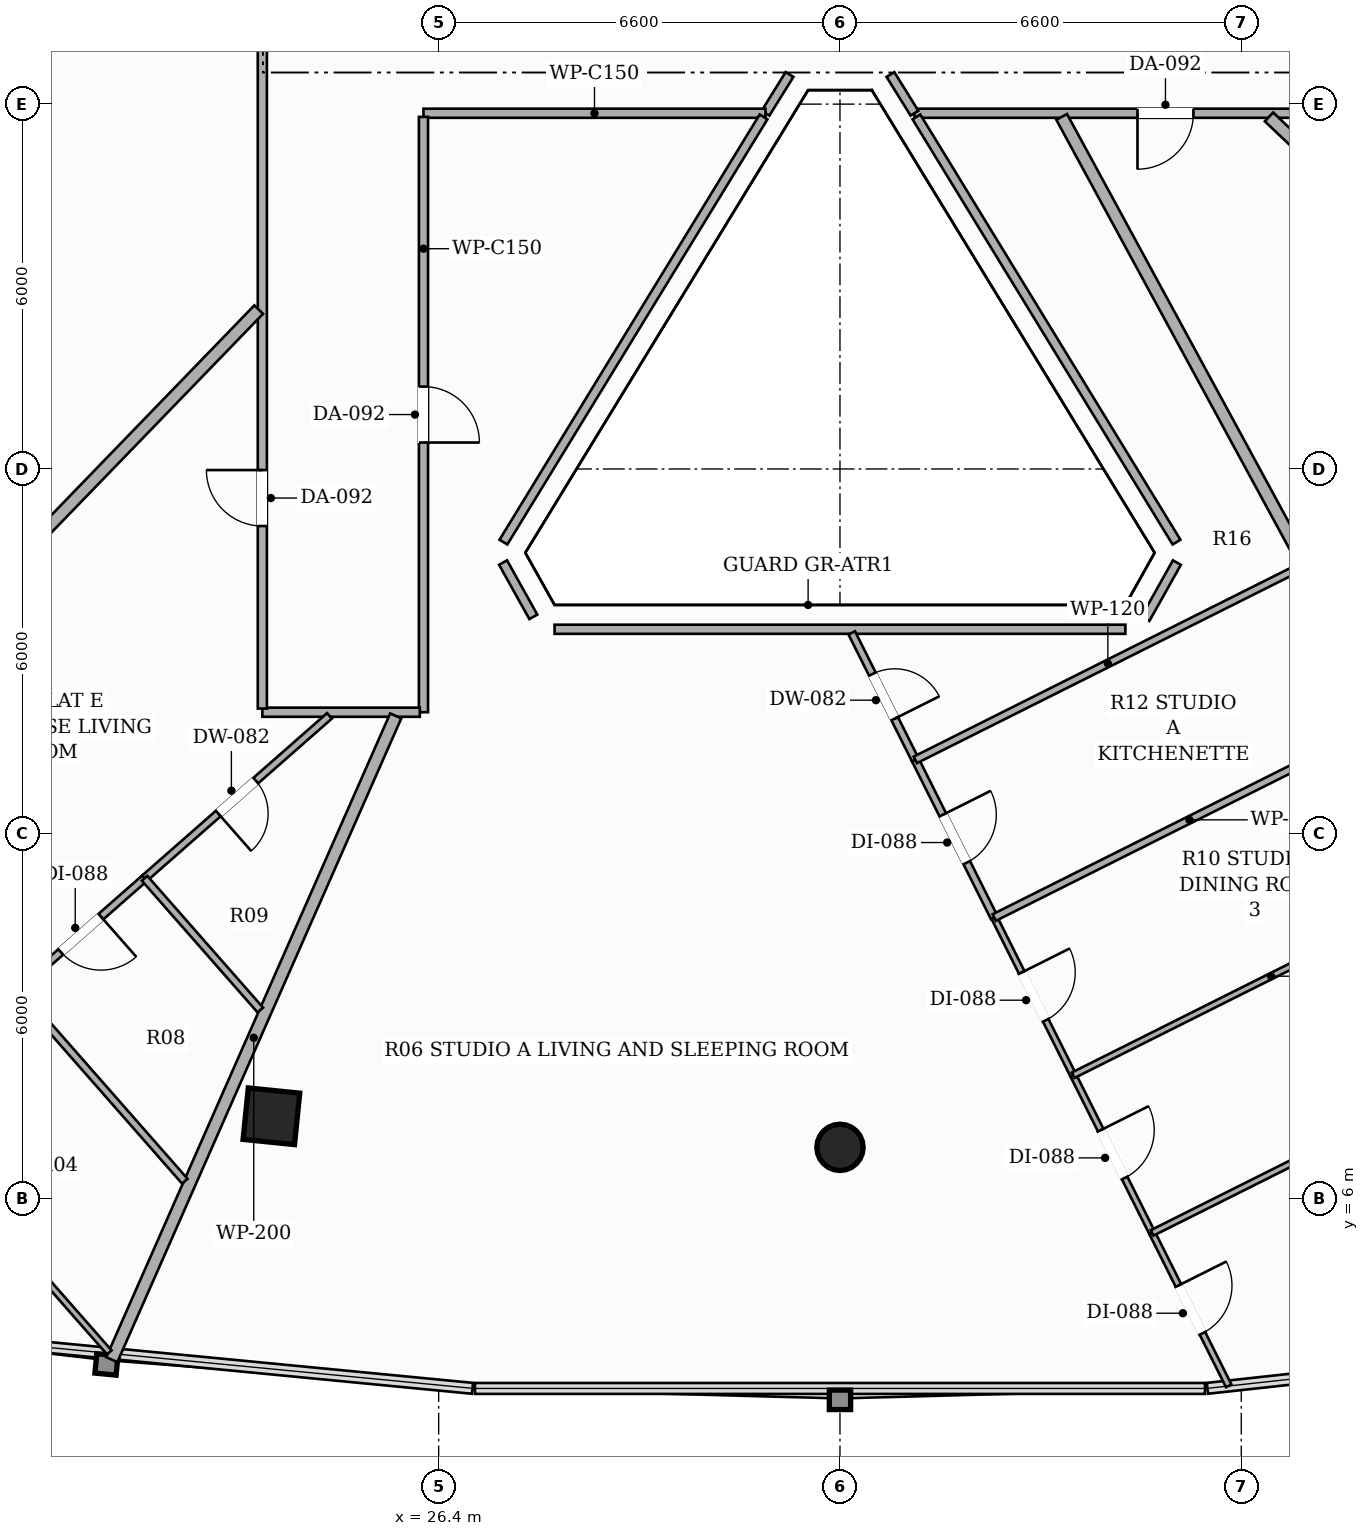
"""IFC4 building model, lengths in metres.
Left out: names, types, materials, properties, quantities, classifications, styles, units other than length and angle.
Written with IfcOpenShell. Run it as: python <this file> out.ifc"""

import sys

from ifc_helpers import new_model, si_unit, direction, frame, frame_2d, origin, origin_2d, place, context, subcontext, project, spatial, rectangle, hollow_rectangle, hollow_circle, extrude, element, fill, save


model = new_model("IFC4")
c1 = context("Model", 3, precision=1e-05, world=origin(), true_north=direction((0.0, 1.0)))
c2 = subcontext(c1, "Body", "Model", "MODEL_VIEW")
j1 = project(units=[si_unit("LENGTHUNIT", "METRE"), si_unit("PLANEANGLEUNIT", "RADIAN")], contexts=[c1])
p1 = place(None, origin())
s1 = spatial("IfcSite", under=j1, at=p1, CompositionType="ELEMENT")
p2 = place(p1, origin())
s2 = spatial("IfcBuilding", under=s1, at=p2, CompositionType="ELEMENT")
p3 = place(p2, frame((0.0, 0.0, 113.3)))
s3 = spatial("IfcBuildingStorey", under=s2, at=p3, CompositionType="ELEMENT", Elevation=113.3)
p4 = place(p3, frame((23.649, 7.355, 0.0), z_axis=(0.0, 0.0, 1.0), x_axis=(-0.994880708829, 0.101056297183, 0.0)))
e1 = element("IfcColumn", 1, at=p4, inside=s3, PredefinedType="COLUMN", context=c2, shape_type="SweptSolid", body=[
    extrude(hollow_rectangle(XDim=0.85, YDim=0.85, WallThickness=0.028, at=origin_2d()), origin(), (0.0, 0.0, 1.0), 3.3),
])
p5 = place(p3, frame((33.0, 6.844, 0.0), z_axis=(0.0, 0.0, 1.0), x_axis=(1.0, 0.0, 0.0)))
e2 = element("IfcColumn", 2, at=p5, inside=s3, PredefinedType="COLUMN", context=c2, shape_type="SweptSolid", body=[
    extrude(hollow_circle(Radius=0.381, WallThickness=0.022, at=origin_2d()), origin(), (0.0, 0.0, 1.0), 3.3),
])
p6 = place(p3, frame((20.095, 34.718, 0.0), z_axis=(0.0, 0.0, 1.0), x_axis=(-0.514362369366, -0.857572943242, 0.0)))
e3 = element("IfcWall", 3, at=p6, inside=s3, PredefinedType="SOLIDWALL", context=c2, shape_type="SweptSolid", body=[
    extrude(rectangle(XDim=11.844, YDim=0.24, at=frame_2d((5.922, 0.0))), origin(), (0.0, 0.0, 1.0), 2.624),
])
p7 = place(p6, frame((9.346, 0.0, 0.0)))
e4 = element("IfcOpeningElement", 4, at=p7, cuts=e3, PredefinedType="OPENING", context=c2, shape_type="SweptSolid", body=[
    extrude(rectangle(XDim=1.8, YDim=2.2, at=frame_2d((0.9, 1.1))), frame((0.0, 0.13, 0.0), z_axis=(0.0, -1.0, 0.0), x_axis=(1.0, 0.0, 0.0)), (0.0, 0.0, 1.0), 0.26),
])
p8 = place(p3, frame((32.17, 24.487, 0.0), z_axis=(0.0, 0.0, 1.0), x_axis=(-0.527038486816, -0.849841416627, 0.0)))
e5 = element("IfcWall", 5, at=p8, inside=s3, PredefinedType="PARTITIONING", context=c2, shape_type="SweptSolid", body=[
    extrude(rectangle(XDim=0.75, YDim=0.15, at=frame_2d((0.375, 0.0))), origin(), (0.0, 0.0, 1.0), 3.06),
])
p9 = place(p3, frame((31.775, 23.85, 0.0), z_axis=(0.0, 0.0, 1.0), x_axis=(-1.0, 0.0, 0.0)))
e6 = element("IfcWall", 6, at=p9, inside=s3, PredefinedType="PARTITIONING", context=c2, shape_type="SweptSolid", body=[
    extrude(rectangle(XDim=5.625, YDim=0.15, at=frame_2d((2.812, 0.0))), origin(), (0.0, 0.0, 1.0), 2.721),
])
p10 = place(p3, frame((26.15, 23.79, 0.0), z_axis=(0.0, 0.0, 1.0), x_axis=(0.0, -1.0, 0.0)))
e7 = element("IfcWall", 7, at=p10, inside=s3, PredefinedType="PARTITIONING", context=c2, shape_type="SweptSolid", body=[
    extrude(rectangle(XDim=9.79, YDim=0.15, at=frame_2d((4.895, 0.0))), origin(), (0.0, 0.0, 1.0), 2.721),
])
p11 = place(p10, frame((4.435, 0.0, 0.0)))
e8 = element("IfcOpeningElement", 8, at=p11, cuts=e7, PredefinedType="OPENING", context=c2, shape_type="SweptSolid", body=[
    extrude(rectangle(XDim=0.92, YDim=2.15, at=frame_2d((0.46, 1.075))), frame((0.0, 0.085, 0.0), z_axis=(0.0, -1.0, 0.0), x_axis=(1.0, 0.0, 0.0)), (0.0, 0.0, 1.0), 0.17),
])
p12 = place(p3, frame((26.09, 14.0, 0.0), z_axis=(0.0, 0.0, 1.0), x_axis=(-1.0, 0.0, 0.0)))
e9 = element("IfcWall", 9, at=p12, inside=s3, PredefinedType="PARTITIONING", context=c2, shape_type="SweptSolid", body=[
    extrude(rectangle(XDim=2.59, YDim=0.15, at=frame_2d((1.295, 0.0))), origin(), (0.0, 0.0, 1.0), 2.721),
])
p13 = place(p3, frame((23.5, 14.06, 0.0), z_axis=(0.0, 0.0, 1.0), x_axis=(0.0, 1.0, 0.0)))
e10 = element("IfcWall", 10, at=p13, inside=s3, PredefinedType="PARTITIONING", context=c2, shape_type="SweptSolid", body=[
    extrude(rectangle(XDim=22.84, YDim=0.15, at=frame_2d((11.42, 0.0))), origin(), (0.0, 0.0, 1.0), 2.413),
])
p14 = place(p13, frame((13.373, 0.0, 0.0)))
e11 = element("IfcOpeningElement", 11, at=p14, cuts=e10, PredefinedType="OPENING", context=c2, shape_type="SweptSolid", body=[
    extrude(rectangle(XDim=0.88, YDim=2.1, at=frame_2d((0.44, 1.05))), frame((0.0, 0.085, 0.0), z_axis=(0.0, -1.0, 0.0), x_axis=(1.0, 0.0, 0.0)), (0.0, 0.0, 1.0), 0.17),
])
p15 = place(p13, frame((3.002, 0.0, 0.0)))
e12 = element("IfcOpeningElement", 12, at=p15, cuts=e10, PredefinedType="OPENING", context=c2, shape_type="SweptSolid", body=[
    extrude(rectangle(XDim=0.92, YDim=2.15, at=frame_2d((0.46, 1.075))), frame((0.0, 0.085, 0.0), z_axis=(0.0, -1.0, 0.0), x_axis=(1.0, 0.0, 0.0)), (0.0, 0.0, 1.0), 0.17),
])
p16 = place(p3, frame((42.29, 23.85, 0.0), z_axis=(0.0, 0.0, 1.0), x_axis=(-1.0, 0.0, 0.0)))
e13 = element("IfcWall", 13, at=p16, inside=s3, PredefinedType="PARTITIONING", context=c2, shape_type="SweptSolid", body=[
    extrude(rectangle(XDim=8.065, YDim=0.15, at=frame_2d((4.032, 0.0))), origin(), (0.0, 0.0, 1.0), 2.492),
])
p17 = place(p16, frame((3.477, 0.0, 0.0)))
e14 = element("IfcOpeningElement", 14, at=p17, cuts=e13, PredefinedType="OPENING", context=c2, shape_type="SweptSolid", body=[
    extrude(rectangle(XDim=0.92, YDim=2.15, at=frame_2d((0.46, 1.075))), frame((0.0, 0.085, 0.0), z_axis=(0.0, -1.0, 0.0), x_axis=(1.0, 0.0, 0.0)), (0.0, 0.0, 1.0), 0.17),
])
p18 = place(p16, frame((0.14, 0.0, 0.0)))
e15 = element("IfcOpeningElement", 15, at=p18, cuts=e13, PredefinedType="OPENING", context=c2, shape_type="SweptSolid", body=[
    extrude(rectangle(XDim=0.88, YDim=2.1, at=frame_2d((0.44, 1.05))), frame((0.0, 0.085, 0.0), z_axis=(0.0, -1.0, 0.0), x_axis=(1.0, 0.0, 0.0)), (0.0, 0.0, 1.0), 0.17),
])
p19 = place(p3, frame((34.225, 23.851, 0.0), z_axis=(0.0, 0.0, 1.0), x_axis=(-0.527622593928, 0.849478898135, 0.0)))
e16 = element("IfcWall", 16, at=p19, inside=s3, PredefinedType="PARTITIONING", context=c2, shape_type="SweptSolid", body=[
    extrude(rectangle(XDim=0.749, YDim=0.15, at=frame_2d((0.375, 0.0))), origin(), (0.0, 0.0, 1.0), 3.06),
])
p20 = place(p3, frame((34.257, 23.79, 0.0), z_axis=(0.0, 0.0, 1.0), x_axis=(0.521839061235, -0.853043957935, 0.0)))
e17 = element("IfcWall", 17, at=p20, inside=s3, PredefinedType="PARTITIONING", context=c2, shape_type="SweptSolid", body=[
    extrude(rectangle(XDim=8.198, YDim=0.15, at=frame_2d((4.099, 0.0))), origin(), (0.0, 0.0, 1.0), 2.721),
])
p21 = place(p3, frame((38.541, 16.461, 0.0), z_axis=(0.0, 0.0, 1.0), x_axis=(-0.488631416095, -0.872490308946, 0.0)))
e18 = element("IfcWall", 18, at=p21, inside=s3, PredefinedType="PARTITIONING", context=c2, shape_type="SweptSolid", body=[
    extrude(rectangle(XDim=1.06, YDim=0.15, at=frame_2d((0.53, 0.0))), origin(), (0.0, 0.0, 1.0), 3.06),
])
p22 = place(p3, frame((37.694, 15.364, 0.0), z_axis=(0.0, 0.0, 1.0), x_axis=(-1.0, 0.0, 0.0)))
e19 = element("IfcWall", 19, at=p22, inside=s3, PredefinedType="PARTITIONING", context=c2, shape_type="SweptSolid", body=[
    extrude(rectangle(XDim=9.388, YDim=0.15, at=frame_2d((4.694, 0.0))), origin(), (0.0, 0.0, 1.0), 2.721),
])
p23 = place(p3, frame((27.957, 15.568, 0.0), z_axis=(0.0, 0.0, 1.0), x_axis=(-0.487162890713, 0.873311123204, 0.0)))
e20 = element("IfcWall", 20, at=p23, inside=s3, PredefinedType="PARTITIONING", context=c2, shape_type="SweptSolid", body=[
    extrude(rectangle(XDim=1.022, YDim=0.15, at=frame_2d((0.511, 0.0))), origin(), (0.0, 0.0, 1.0), 3.06),
])
p24 = place(p3, frame((27.465, 16.797, 0.0), z_axis=(0.0, 0.0, 1.0), x_axis=(0.521839061235, 0.853043957935, 0.0)))
e21 = element("IfcWall", 21, at=p24, inside=s3, PredefinedType="PARTITIONING", context=c2, shape_type="SweptSolid", body=[
    extrude(rectangle(XDim=8.198, YDim=0.15, at=frame_2d((4.099, 0.0))), origin(), (0.0, 0.0, 1.0), 2.721),
])
p25 = place(p3, frame((36.646, 23.79, 0.0), z_axis=(0.0, 0.0, 1.0), x_axis=(0.477391569207, -0.878690667784, 0.0)))
e22 = element("IfcWall", 22, at=p25, inside=s3, PredefinedType="PARTITIONING", context=c2, shape_type="SweptSolid", body=[
    extrude(rectangle(XDim=22.918, YDim=0.2, at=frame_2d((11.459, 0.0))), origin(), (0.0, 0.0, 1.0), 2.413),
])
p26 = place(p3, frame((21.024, 3.353, 0.0), z_axis=(0.0, 0.0, 1.0), x_axis=(0.403601766718, 0.914934759369, 0.0)))
e23 = element("IfcWall", 23, at=p26, inside=s3, PredefinedType="PARTITIONING", context=c2, shape_type="SweptSolid", body=[
    extrude(rectangle(XDim=11.571, YDim=0.2, at=frame_2d((5.786, 0.0))), origin(), (0.0, 0.0, 1.0), 2.413),
])
p27 = place(p3, frame((23.44, 20.621, 0.0), z_axis=(0.0, 0.0, 1.0), x_axis=(-0.695405261367, -0.718617786075, 0.0)))
e24 = element("IfcWall", 24, at=p27, inside=s3, PredefinedType="PARTITIONING", context=c2, shape_type="SweptSolid", body=[
    extrude(rectangle(XDim=21.635, YDim=0.2, at=frame_2d((10.817, 0.0))), origin(), (0.0, 0.0, 1.0), 2.413),
])
p28 = place(p3, frame((40.056, 23.79, 0.0), z_axis=(0.0, 0.0, 1.0), x_axis=(0.724633427165, -0.68913452695, 0.0)))
e25 = element("IfcWall", 25, at=p28, inside=s3, PredefinedType="PARTITIONING", context=c2, shape_type="SweptSolid", body=[
    extrude(rectangle(XDim=25.921, YDim=0.2, at=frame_2d((12.96, 0.0))), origin(), (0.0, 0.0, 1.0), 2.413),
])
p29 = place(p3, frame((33.194, 15.304, 0.0), z_axis=(0.0, 0.0, 1.0), x_axis=(0.447548179666, -0.894259820677, 0.0)))
e26 = element("IfcWall", 26, at=p29, inside=s3, PredefinedType="PARTITIONING", context=c2, shape_type="SweptSolid", body=[
    extrude(rectangle(XDim=2.335, YDim=0.12, at=frame_2d((1.167, 0.0))), origin(), (0.0, 0.0, 1.0), 2.721),
])
p30 = place(p29, frame((0.757, 0.0, 0.0)))
e27 = element("IfcOpeningElement", 27, at=p30, cuts=e26, PredefinedType="OPENING", context=c2, shape_type="SweptSolid", body=[
    extrude(rectangle(XDim=0.82, YDim=2.1, at=frame_2d((0.41, 1.05))), frame((0.0, 0.07, 0.0), z_axis=(0.0, -1.0, 0.0), x_axis=(1.0, 0.0, 0.0)), (0.0, 0.0, 1.0), 0.14),
])
p31 = place(p3, frame((34.239, 13.216, 0.0), z_axis=(0.0, 0.0, 1.0), x_axis=(0.447651342751, -0.894208183441, 0.0)))
e28 = element("IfcWall", 28, at=p31, inside=s3, PredefinedType="PARTITIONING", context=c2, shape_type="SweptSolid", body=[
    extrude(rectangle(XDim=2.9, YDim=0.12, at=frame_2d((1.45, 0.0))), origin(), (0.0, 0.0, 1.0), 3.06),
])
p32 = place(p31, frame((1.01, 0.0, 0.0)))
e29 = element("IfcOpeningElement", 29, at=p32, cuts=e28, PredefinedType="OPENING", context=c2, shape_type="SweptSolid", body=[
    extrude(rectangle(XDim=0.88, YDim=2.1, at=frame_2d((0.44, 1.05))), frame((0.0, 0.07, 0.0), z_axis=(0.0, -1.0, 0.0), x_axis=(1.0, 0.0, 0.0)), (0.0, 0.0, 1.0), 0.14),
])
p33 = place(p3, frame((38.134, 5.437, 0.0), z_axis=(0.0, 0.0, 1.0), x_axis=(0.447768773835, -0.894149386388, 0.0)))
e30 = element("IfcWall", 30, at=p33, inside=s3, PredefinedType="PARTITIONING", context=c2, shape_type="SweptSolid", body=[
    extrude(rectangle(XDim=2.814, YDim=0.1, at=frame_2d((1.407, 0.0))), origin(), (0.0, 0.0, 1.0), 3.06),
])
p34 = place(p33, frame((0.967, 0.0, 0.0)))
e31 = element("IfcOpeningElement", 31, at=p34, cuts=e30, PredefinedType="OPENING", context=c2, shape_type="SweptSolid", body=[
    extrude(rectangle(XDim=0.88, YDim=2.1, at=frame_2d((0.44, 1.05))), frame((0.0, 0.06, 0.0), z_axis=(0.0, -1.0, 0.0), x_axis=(1.0, 0.0, 0.0)), (0.0, 0.0, 1.0), 0.12),
])
p35 = place(p3, frame((36.836, 8.03, 0.0), z_axis=(0.0, 0.0, 1.0), x_axis=(0.447651342751, -0.894208183441, 0.0)))
e32 = element("IfcWall", 32, at=p35, inside=s3, PredefinedType="PARTITIONING", context=c2, shape_type="SweptSolid", body=[
    extrude(rectangle(XDim=2.9, YDim=0.1, at=frame_2d((1.45, 0.0))), origin(), (0.0, 0.0, 1.0), 2.413),
])
p36 = place(p35, frame((1.01, 0.0, 0.0)))
e33 = element("IfcOpeningElement", 33, at=p36, cuts=e32, PredefinedType="OPENING", context=c2, shape_type="SweptSolid", body=[
    extrude(rectangle(XDim=0.88, YDim=2.1, at=frame_2d((0.44, 1.05))), frame((0.0, 0.06, 0.0), z_axis=(0.0, -1.0, 0.0), x_axis=(1.0, 0.0, 0.0)), (0.0, 0.0, 1.0), 0.12),
])
p37 = place(p3, frame((35.537, 10.623, 0.0), z_axis=(0.0, 0.0, 1.0), x_axis=(0.447853271476, -0.894107066983, 0.0)))
e34 = element("IfcWall", 34, at=p37, inside=s3, PredefinedType="PARTITIONING", context=c2, shape_type="SweptSolid", body=[
    extrude(rectangle(XDim=2.9, YDim=0.1, at=frame_2d((1.45, 0.0))), origin(), (0.0, 0.0, 1.0), 3.06),
])
p38 = place(p37, frame((1.01, 0.0, 0.0)))
e35 = element("IfcOpeningElement", 35, at=p38, cuts=e34, PredefinedType="OPENING", context=c2, shape_type="SweptSolid", body=[
    extrude(rectangle(XDim=0.88, YDim=2.1, at=frame_2d((0.44, 1.05))), frame((0.0, 0.06, 0.0), z_axis=(0.0, -1.0, 0.0), x_axis=(1.0, 0.0, 0.0)), (0.0, 0.0, 1.0), 0.12),
])
p39 = place(p3, frame((40.572, 16.387, 0.0), z_axis=(0.0, 0.0, 1.0), x_axis=(-0.894178861749, -0.447709909653, 0.0)))
e36 = element("IfcWall", 36, at=p39, inside=s3, PredefinedType="PARTITIONING", context=c2, shape_type="SweptSolid", body=[
    extrude(rectangle(XDim=7.083, YDim=0.12, at=frame_2d((3.541, 0.0))), origin(), (0.0, 0.0, 1.0), 2.721),
])
p40 = place(p3, frame((41.957, 13.837, 0.0), z_axis=(0.0, 0.0, 1.0), x_axis=(-0.894209449688, -0.447648813344, 0.0)))
e37 = element("IfcWall", 37, at=p40, inside=s3, PredefinedType="PARTITIONING", context=c2, shape_type="SweptSolid", body=[
    extrude(rectangle(XDim=7.179, YDim=0.12, at=frame_2d((3.59, 0.0))), origin(), (0.0, 0.0, 1.0), 2.721),
])
p41 = place(p3, frame((38.134, 5.437, 0.0), z_axis=(0.0, 0.0, 1.0), x_axis=(0.894182030014, 0.447703581849, 0.0)))
e38 = element("IfcWall", 38, at=p41, inside=s3, PredefinedType="PARTITIONING", context=c2, shape_type="SweptSolid", body=[
    extrude(rectangle(XDim=7.373, YDim=0.1, at=frame_2d((3.687, 0.0))), origin(), (0.0, 0.0, 1.0), 2.413),
])
p42 = place(p3, frame((36.836, 8.03, 0.0), z_axis=(0.0, 0.0, 1.0), x_axis=(0.894205618721, 0.447656465884, 0.0)))
e39 = element("IfcWall", 39, at=p42, inside=s3, PredefinedType="PARTITIONING", context=c2, shape_type="SweptSolid", body=[
    extrude(rectangle(XDim=7.276, YDim=0.1, at=frame_2d((3.638, 0.0))), origin(), (0.0, 0.0, 1.0), 2.721),
])
p43 = place(p3, frame((24.604, 13.94, 0.0), z_axis=(0.0, 0.0, 1.0), x_axis=(-0.751349767919, -0.659904179595, 0.0)))
e40 = element("IfcWall", 40, at=p43, inside=s3, PredefinedType="PARTITIONING", context=c2, shape_type="SweptSolid", body=[
    extrude(rectangle(XDim=4.047, YDim=0.12, at=frame_2d((2.024, 0.0))), origin(), (0.0, 0.0, 1.0), 2.721),
])
p44 = place(p43, frame((1.614, 0.0, 0.0)))
e41 = element("IfcOpeningElement", 41, at=p44, cuts=e40, PredefinedType="OPENING", context=c2, shape_type="SweptSolid", body=[
    extrude(rectangle(XDim=0.82, YDim=2.1, at=frame_2d((0.41, 1.05))), frame((0.0, 0.07, 0.0), z_axis=(0.0, -1.0, 0.0), x_axis=(1.0, 0.0, 0.0)), (0.0, 0.0, 1.0), 0.14),
])
p45 = place(p3, frame((21.563, 11.269, 0.0), z_axis=(0.0, 0.0, 1.0), x_axis=(-0.751138604229, -0.660144527537, 0.0)))
e42 = element("IfcWall", 42, at=p45, inside=s3, PredefinedType="PARTITIONING", context=c2, shape_type="SweptSolid", body=[
    extrude(rectangle(XDim=2.79, YDim=0.12, at=frame_2d((1.395, 0.0))), origin(), (0.0, 0.0, 1.0), 2.721),
])
p46 = place(p45, frame((0.955, 0.0, 0.0)))
e43 = element("IfcOpeningElement", 43, at=p46, cuts=e42, PredefinedType="OPENING", context=c2, shape_type="SweptSolid", body=[
    extrude(rectangle(XDim=0.88, YDim=2.1, at=frame_2d((0.44, 1.05))), frame((0.0, 0.07, 0.0), z_axis=(0.0, -1.0, 0.0), x_axis=(1.0, 0.0, 0.0)), (0.0, 0.0, 1.0), 0.14),
])
p47 = place(p3, frame((23.467, 9.102, 0.0), z_axis=(0.0, 0.0, 1.0), x_axis=(-0.660061062947, 0.751211949573, 0.0)))
e44 = element("IfcWall", 44, at=p47, inside=s3, PredefinedType="PARTITIONING", context=c2, shape_type="SweptSolid", body=[
    extrude(rectangle(XDim=2.885, YDim=0.12, at=frame_2d((1.442, 0.0))), origin(), (0.0, 0.0, 1.0), 2.721),
])
p48 = place(p3, frame((22.225, 6.287, 0.0), z_axis=(0.0, 0.0, 1.0), x_axis=(-0.659946783628, 0.751312347016, 0.0)))
e45 = element("IfcWall", 45, at=p48, inside=s3, PredefinedType="PARTITIONING", context=c2, shape_type="SweptSolid", body=[
    extrude(rectangle(XDim=4.179, YDim=0.12, at=frame_2d((2.09, 0.0))), origin(), (0.0, 0.0, 1.0), 2.413),
])
p49 = place(p3, frame((17.37, 7.586, 0.0), z_axis=(0.0, 0.0, 1.0), x_axis=(0.659851528992, -0.751396007234, 0.0)))
e46 = element("IfcWall", 46, at=p49, inside=s3, PredefinedType="PARTITIONING", context=c2, shape_type="SweptSolid", body=[
    extrude(rectangle(XDim=5.475, YDim=0.1, at=frame_2d((2.738, 0.0))), origin(), (0.0, 0.0, 1.0), 2.413),
])
p50 = place(p11, origin())
e47 = element("IfcDoor", 47, at=p50, inside=s3, OperationType="SINGLE_SWING_RIGHT", PredefinedType="DOOR", context=c2, shape_type="SweptSolid", body=[
    extrude(rectangle(XDim=0.92, YDim=2.15, at=frame_2d((0.46, 1.075))), frame((0.0, 0.025, 0.0), z_axis=(0.0, -1.0, 0.0), x_axis=(1.0, 0.0, 0.0)), (0.0, 0.0, 1.0), 0.05),
])
fill(e8, e47)
p51 = place(p30, origin())
e48 = element("IfcDoor", 48, at=p51, inside=s3, OperationType="SINGLE_SWING_RIGHT", PredefinedType="DOOR", context=c2, shape_type="SweptSolid", body=[
    extrude(rectangle(XDim=0.82, YDim=2.1, at=frame_2d((0.41, 1.05))), frame((0.0, 0.025, 0.0), z_axis=(0.0, -1.0, 0.0), x_axis=(1.0, 0.0, 0.0)), (0.0, 0.0, 1.0), 0.05),
])
fill(e27, e48)
p52 = place(p32, origin())
e49 = element("IfcDoor", 49, at=p52, inside=s3, OperationType="SINGLE_SWING_LEFT", PredefinedType="DOOR", context=c2, shape_type="SweptSolid", body=[
    extrude(rectangle(XDim=0.88, YDim=2.1, at=frame_2d((0.44, 1.05))), frame((0.0, 0.025, 0.0), z_axis=(0.0, -1.0, 0.0), x_axis=(1.0, 0.0, 0.0)), (0.0, 0.0, 1.0), 0.05),
])
fill(e29, e49)
p53 = place(p34, origin())
e50 = element("IfcDoor", 50, at=p53, inside=s3, OperationType="SINGLE_SWING_LEFT", PredefinedType="DOOR", context=c2, shape_type="SweptSolid", body=[
    extrude(rectangle(XDim=0.88, YDim=2.1, at=frame_2d((0.44, 1.05))), frame((0.0, 0.025, 0.0), z_axis=(0.0, -1.0, 0.0), x_axis=(1.0, 0.0, 0.0)), (0.0, 0.0, 1.0), 0.05),
])
fill(e31, e50)
p54 = place(p36, origin())
e51 = element("IfcDoor", 51, at=p54, inside=s3, OperationType="SINGLE_SWING_LEFT", PredefinedType="DOOR", context=c2, shape_type="SweptSolid", body=[
    extrude(rectangle(XDim=0.88, YDim=2.1, at=frame_2d((0.44, 1.05))), frame((0.0, 0.025, 0.0), z_axis=(0.0, -1.0, 0.0), x_axis=(1.0, 0.0, 0.0)), (0.0, 0.0, 1.0), 0.05),
])
fill(e33, e51)
p55 = place(p38, origin())
e52 = element("IfcDoor", 52, at=p55, inside=s3, OperationType="SINGLE_SWING_LEFT", PredefinedType="DOOR", context=c2, shape_type="SweptSolid", body=[
    extrude(rectangle(XDim=0.88, YDim=2.1, at=frame_2d((0.44, 1.05))), frame((0.0, 0.025, 0.0), z_axis=(0.0, -1.0, 0.0), x_axis=(1.0, 0.0, 0.0)), (0.0, 0.0, 1.0), 0.05),
])
fill(e35, e52)
p56 = place(p17, origin())
e53 = element("IfcDoor", 53, at=p56, inside=s3, OperationType="SINGLE_SWING_RIGHT", PredefinedType="DOOR", context=c2, shape_type="SweptSolid", body=[
    extrude(rectangle(XDim=0.92, YDim=2.15, at=frame_2d((0.46, 1.075))), frame((0.0, 0.025, 0.0), z_axis=(0.0, -1.0, 0.0), x_axis=(1.0, 0.0, 0.0)), (0.0, 0.0, 1.0), 0.05),
])
fill(e14, e53)
p57 = place(p15, origin())
e54 = element("IfcDoor", 54, at=p57, inside=s3, OperationType="SINGLE_SWING_RIGHT", PredefinedType="DOOR", context=c2, shape_type="SweptSolid", body=[
    extrude(rectangle(XDim=0.92, YDim=2.15, at=frame_2d((0.46, 1.075))), frame((0.0, 0.025, 0.0), z_axis=(0.0, -1.0, 0.0), x_axis=(1.0, 0.0, 0.0)), (0.0, 0.0, 1.0), 0.05),
])
fill(e12, e54)
p58 = place(p44, origin())
e55 = element("IfcDoor", 55, at=p58, inside=s3, OperationType="SINGLE_SWING_RIGHT", PredefinedType="DOOR", context=c2, shape_type="SweptSolid", body=[
    extrude(rectangle(XDim=0.82, YDim=2.1, at=frame_2d((0.41, 1.05))), frame((0.0, 0.025, 0.0), z_axis=(0.0, -1.0, 0.0), x_axis=(1.0, 0.0, 0.0)), (0.0, 0.0, 1.0), 0.05),
])
fill(e41, e55)
p59 = place(p46, origin())
e56 = element("IfcDoor", 56, at=p59, inside=s3, OperationType="SINGLE_SWING_LEFT", PredefinedType="DOOR", context=c2, shape_type="SweptSolid", body=[
    extrude(rectangle(XDim=0.88, YDim=2.1, at=frame_2d((0.44, 1.05))), frame((0.0, 0.025, 0.0), z_axis=(0.0, -1.0, 0.0), x_axis=(1.0, 0.0, 0.0)), (0.0, 0.0, 1.0), 0.05),
])
fill(e43, e56)
save(model, sys.argv[1])
